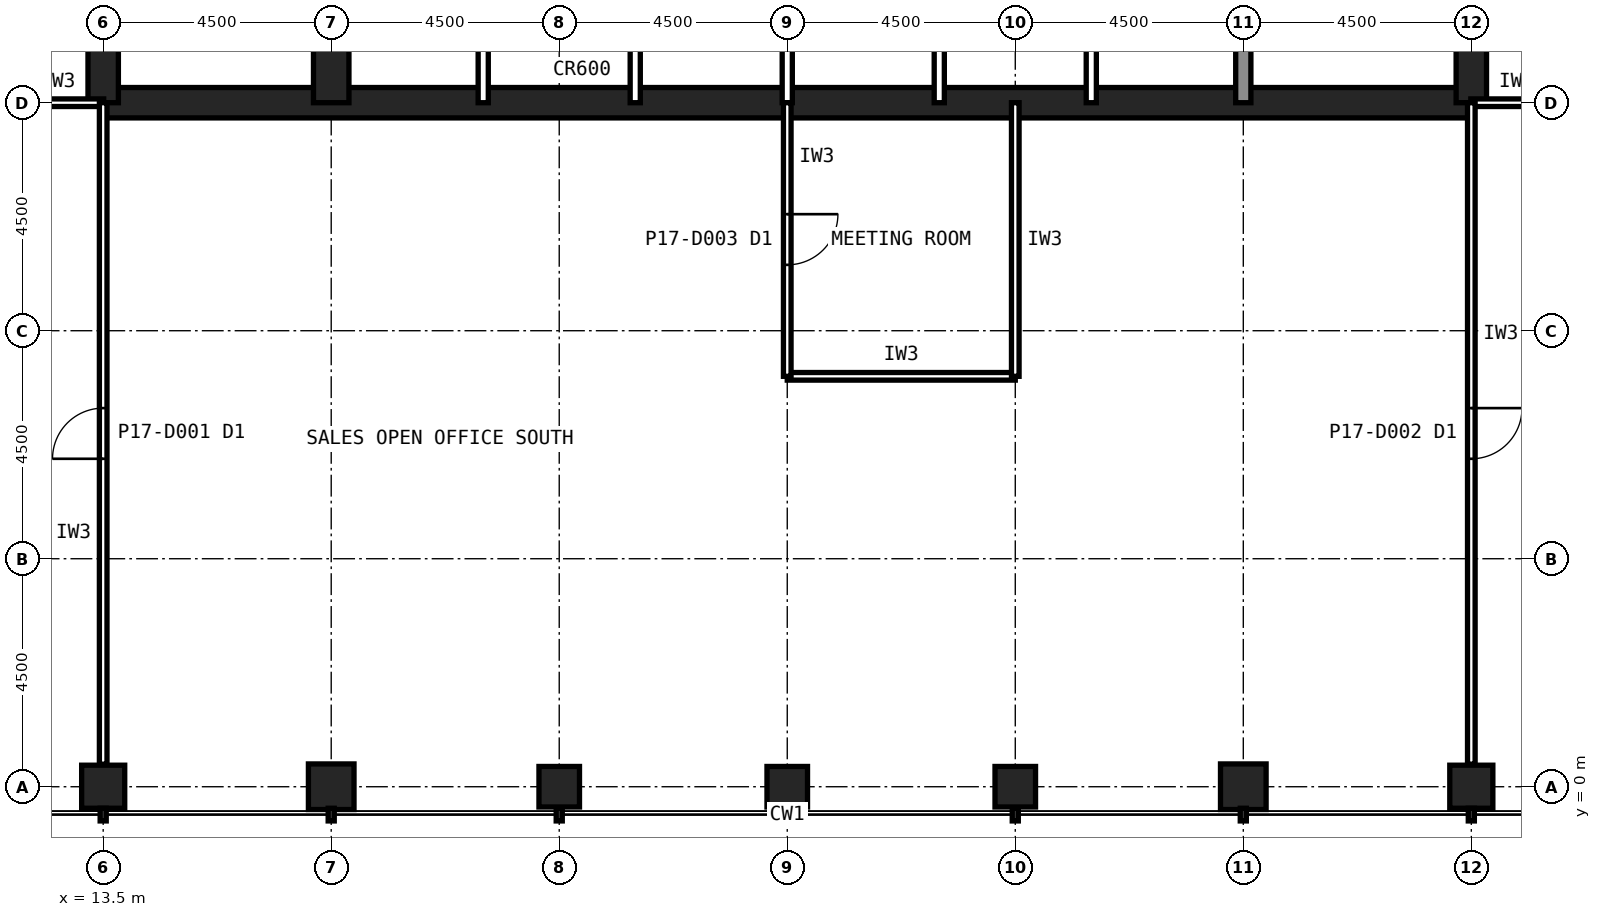
"""IFC4 building model, lengths in metres.
Left out: names, types, materials, properties, quantities, classifications, styles, units other than length and angle.
Written with IfcOpenShell. Run it as: python <this file> out.ifc"""

import sys

from ifc_helpers import new_model, si_unit, direction, frame, frame_2d, origin, origin_2d, place, context, subcontext, project, spatial, rectangle, hollow_rectangle, extrude, element, fill, save


model = new_model("IFC4")
c1 = context("Model", 3, precision=1e-05, world=origin(), true_north=direction((0.0, 1.0)))
c2 = subcontext(c1, "Body", "Model", "MODEL_VIEW")
j1 = project(units=[si_unit("LENGTHUNIT", "METRE"), si_unit("PLANEANGLEUNIT", "RADIAN")], contexts=[c1])
p1 = place(None, origin())
s1 = spatial("IfcSite", under=j1, at=p1, CompositionType="ELEMENT")
p2 = place(p1, origin())
s2 = spatial("IfcBuilding", under=s1, at=p2, CompositionType="ELEMENT")
p3 = place(p2, frame((0.0, 0.0, 71.0)))
s3 = spatial("IfcBuildingStorey", under=s2, at=p3, CompositionType="ELEMENT", Elevation=71.0)
p4 = place(p3, frame((13.5, 0.0, 0.0), z_axis=(0.0, 0.0, 1.0), x_axis=(1.0, 0.0, 0.0)))
e1 = element("IfcColumn", 1, at=p4, inside=s3, PredefinedType="COLUMN", context=c2, shape_type="SweptSolid", body=[
    extrude(hollow_rectangle(XDim=0.85, YDim=0.85, WallThickness=0.05, at=origin_2d()), origin(), (0.0, 0.0, 1.0), 4.2),
])
p5 = place(p3, frame((18.0, 0.0, 0.0), z_axis=(0.0, 0.0, 1.0), x_axis=(1.0, 0.0, 0.0)))
e2 = element("IfcColumn", 2, at=p5, inside=s3, PredefinedType="COLUMN", context=c2, shape_type="SweptSolid", body=[
    extrude(hollow_rectangle(XDim=0.9, YDim=0.9, WallThickness=0.063, at=origin_2d()), origin(), (0.0, 0.0, 1.0), 4.2),
])
for number, where, z_axis, x_axis in (
    (3, (22.5, 0.0, 0.0), (0.0, 0.0, 1.0), (1.0, 0.0, 0.0)),
    (4, (27.0, 0.0, 0.0), (0.0, 0.0, 1.0), (1.0, 0.0, 0.0)),
    (5, (31.5, 0.0, 0.0), (0.0, 0.0, 1.0), (1.0, 0.0, 0.0)),
):
    element("IfcColumn", number, at=place(p3, frame(where, z_axis=z_axis, x_axis=x_axis)), inside=s3, PredefinedType="COLUMN", context=c2, shape_type="SweptSolid", body=[
        extrude(hollow_rectangle(XDim=0.8, YDim=0.8, WallThickness=0.045, at=origin_2d()), origin(), (0.0, 0.0, 1.0), 4.2),
    ])
p6 = place(p3, frame((36.0, 0.0, 0.0), z_axis=(0.0, 0.0, 1.0), x_axis=(1.0, 0.0, 0.0)))
e6 = element("IfcColumn", 6, at=p6, inside=s3, PredefinedType="COLUMN", context=c2, shape_type="SweptSolid", body=[
    extrude(hollow_rectangle(XDim=0.9, YDim=0.9, WallThickness=0.063, at=origin_2d()), origin(), (0.0, 0.0, 1.0), 4.2),
])
p7 = place(p3, frame((40.5, 0.0, 0.0), z_axis=(0.0, 0.0, 1.0), x_axis=(1.0, 0.0, 0.0)))
e7 = element("IfcColumn", 7, at=p7, inside=s3, PredefinedType="COLUMN", context=c2, shape_type="SweptSolid", body=[
    extrude(hollow_rectangle(XDim=0.85, YDim=0.85, WallThickness=0.05, at=origin_2d()), origin(), (0.0, 0.0, 1.0), 4.2),
])
p8 = place(p3, frame((13.5, 13.5, 0.0), z_axis=(0.0, 0.0, 1.0), x_axis=(1.0, 0.0, 0.0)))
e8 = element("IfcWall", 8, at=p8, inside=s3, PredefinedType="SHEAR", context=c2, shape_type="SweptSolid", body=[
    extrude(rectangle(XDim=27.0, YDim=0.6, at=frame_2d((13.5, 0.0))), origin(), (0.0, 0.0, 1.0), 4.2),
])
p9 = place(p3, frame((40.5, 13.5, 0.0), z_axis=(0.0, 0.0, 1.0), x_axis=(0.0, 1.0, 0.0)))
e9 = element("IfcWall", 9, at=p9, inside=s3, PredefinedType="SHEAR", context=c2, shape_type="SweptSolid", body=[
    extrude(rectangle(XDim=27.0, YDim=0.6, at=frame_2d((13.5, 0.0))), origin(), (0.0, 0.0, 1.0), 4.2),
])
p10 = place(p9, frame((5.85, 0.0, 0.0)))
e10 = element("IfcOpeningElement", 10, at=p10, cuts=e9, PredefinedType="OPENING", context=c2, shape_type="SweptSolid", body=[
    extrude(rectangle(XDim=1.8, YDim=2.1, at=frame_2d((0.9, 1.05))), frame((0.0, 0.31, 0.0), z_axis=(0.0, -1.0, 0.0), x_axis=(1.0, 0.0, 0.0)), (0.0, 0.0, 1.0), 0.62),
])
p11 = place(p9, frame((19.65, 0.0, 0.0)))
e11 = element("IfcOpeningElement", 11, at=p11, cuts=e9, PredefinedType="OPENING", context=c2, shape_type="SweptSolid", body=[
    extrude(rectangle(XDim=1.2, YDim=2.1, at=frame_2d((0.6, 1.05))), frame((0.0, 0.31, 0.0), z_axis=(0.0, -1.0, 0.0), x_axis=(1.0, 0.0, 0.0)), (0.0, 0.0, 1.0), 0.62),
])
p12 = place(p3, frame((13.5, 40.5, 0.0), z_axis=(0.0, 0.0, 1.0), x_axis=(0.0, -1.0, 0.0)))
e12 = element("IfcWall", 12, at=p12, inside=s3, PredefinedType="SHEAR", context=c2, shape_type="SweptSolid", body=[
    extrude(rectangle(XDim=27.0, YDim=0.6, at=frame_2d((13.5, 0.0))), origin(), (0.0, 0.0, 1.0), 4.2),
])
p13 = place(p12, frame((19.65, 0.0, 0.0)))
e13 = element("IfcOpeningElement", 13, at=p13, cuts=e12, PredefinedType="OPENING", context=c2, shape_type="SweptSolid", body=[
    extrude(rectangle(XDim=1.2, YDim=2.1, at=frame_2d((0.6, 1.05))), frame((0.0, 0.31, 0.0), z_axis=(0.0, -1.0, 0.0), x_axis=(1.0, 0.0, 0.0)), (0.0, 0.0, 1.0), 0.62),
])
p14 = place(p12, frame((5.85, 0.0, 0.0)))
e14 = element("IfcOpeningElement", 14, at=p14, cuts=e12, PredefinedType="OPENING", context=c2, shape_type="SweptSolid", body=[
    extrude(rectangle(XDim=1.8, YDim=2.1, at=frame_2d((0.9, 1.05))), frame((0.0, 0.31, 0.0), z_axis=(0.0, -1.0, 0.0), x_axis=(1.0, 0.0, 0.0)), (0.0, 0.0, 1.0), 0.62),
])
p15 = place(p3, frame((18.0, 13.5, 0.0), z_axis=(0.0, 0.0, 1.0), x_axis=(0.0, 1.0, 0.0)))
e15 = element("IfcWall", 15, at=p15, inside=s3, PredefinedType="SHEAR", context=c2, shape_type="SweptSolid", body=[
    extrude(rectangle(XDim=18.0, YDim=0.7, at=frame_2d((9.0, 0.0))), origin(), (0.0, 0.0, 1.0), 4.2),
])
p16 = place(p3, frame((36.0, 13.5, 0.0), z_axis=(0.0, 0.0, 1.0), x_axis=(0.0, 1.0, 0.0)))
e16 = element("IfcWall", 16, at=p16, inside=s3, PredefinedType="SOLIDWALL", context=c2, shape_type="SweptSolid", body=[
    extrude(rectangle(XDim=4.5, YDim=0.3, at=frame_2d((2.25, 0.0))), origin(), (0.0, 0.0, 1.0), 4.04),
])
for number, where, z_axis, x_axis in (
    (17, (21.0, 13.5, 0.0), (0.0, 0.0, 1.0), (0.0, 1.0, 0.0)),
    (18, (24.0, 13.5, 0.0), (0.0, 0.0, 1.0), (0.0, 1.0, 0.0)),
    (19, (27.0, 13.5, 0.0), (0.0, 0.0, 1.0), (0.0, 1.0, 0.0)),
    (20, (30.0, 13.5, 0.0), (0.0, 0.0, 1.0), (0.0, 1.0, 0.0)),
    (21, (33.0, 13.5, 0.0), (0.0, 0.0, 1.0), (0.0, 1.0, 0.0)),
):
    element("IfcWall", number, at=place(p3, frame(where, z_axis=z_axis, x_axis=x_axis)), inside=s3, PredefinedType="PARTITIONING", context=c2, shape_type="SweptSolid", body=[
        extrude(rectangle(XDim=4.5, YDim=0.2, at=frame_2d((2.25, 0.0))), origin(), (0.0, 0.0, 1.0), 4.04),
    ])
for number, where, z_axis, x_axis in (
    (22, (11.7, 13.5, 0.0), (0.0, 0.0, 1.0), (1.0, 0.0, 0.0)),
    (23, (40.49, 13.5, 0.0), (0.0, 0.0, 1.0), (1.0, 0.0, 0.0)),
):
    element("IfcWall", number, at=place(p3, frame(where, z_axis=z_axis, x_axis=x_axis)), inside=s3, PredefinedType="PARTITIONING", context=c2, shape_type="SweptSolid", body=[
        extrude(rectangle(XDim=1.81, YDim=0.15, at=frame_2d((0.905, 0.0))), origin(), (0.0, 0.0, 1.0), 3.189),
    ])
p17 = place(p3, frame((27.0, 8.1, 0.0), z_axis=(0.0, 0.0, 1.0), x_axis=(1.0, 0.0, 0.0)))
e24 = element("IfcWall", 24, at=p17, inside=s3, PredefinedType="PARTITIONING", context=c2, shape_type="SweptSolid", body=[
    extrude(rectangle(XDim=4.5, YDim=0.15, at=frame_2d((2.25, 0.0))), origin(), (0.0, 0.0, 1.0), 4.04),
])
p18 = place(p3, frame((31.5, 8.1, 0.0), z_axis=(0.0, 0.0, 1.0), x_axis=(0.0, 1.0, 0.0)))
e25 = element("IfcWall", 25, at=p18, inside=s3, PredefinedType="PARTITIONING", context=c2, shape_type="SweptSolid", body=[
    extrude(rectangle(XDim=5.4, YDim=0.15, at=frame_2d((2.7, 0.0))), origin(), (0.0, 0.0, 1.0), 3.189),
])
p19 = place(p3, frame((27.0, 13.5, 0.0), z_axis=(0.0, 0.0, 1.0), x_axis=(0.0, -1.0, 0.0)))
e26 = element("IfcWall", 26, at=p19, inside=s3, PredefinedType="PARTITIONING", context=c2, shape_type="SweptSolid", body=[
    extrude(rectangle(XDim=5.4, YDim=0.15, at=frame_2d((2.7, 0.0))), origin(), (0.0, 0.0, 1.0), 3.189),
])
p20 = place(p19, frame((2.2, 0.0, 0.0)))
e27 = element("IfcOpeningElement", 27, at=p20, cuts=e26, PredefinedType="OPENING", context=c2, shape_type="SweptSolid", body=[
    extrude(rectangle(XDim=1.0, YDim=2.1, at=frame_2d((0.5, 1.05))), frame((0.0, 0.085, 0.0), z_axis=(0.0, -1.0, 0.0), x_axis=(1.0, 0.0, 0.0)), (0.0, 0.0, 1.0), 0.17),
])
p21 = place(p3, frame((13.5, 0.445, 0.0), z_axis=(0.0, 0.0, 1.0), x_axis=(0.0, 1.0, 0.0)))
e28 = element("IfcWall", 28, at=p21, inside=s3, PredefinedType="PARTITIONING", context=c2, shape_type="SweptSolid", body=[
    extrude(rectangle(XDim=13.055, YDim=0.15, at=frame_2d((6.527, 0.0))), origin(), (0.0, 0.0, 1.0), 3.189),
])
p22 = place(p21, frame((6.028, 0.0, 0.0)))
e29 = element("IfcOpeningElement", 29, at=p22, cuts=e28, PredefinedType="OPENING", context=c2, shape_type="SweptSolid", body=[
    extrude(rectangle(XDim=1.0, YDim=2.1, at=frame_2d((0.5, 1.05))), frame((0.0, 0.085, 0.0), z_axis=(0.0, -1.0, 0.0), x_axis=(1.0, 0.0, 0.0)), (0.0, 0.0, 1.0), 0.17),
])
p23 = place(p3, frame((40.5, 13.5, 0.0), z_axis=(0.0, 0.0, 1.0), x_axis=(0.0, -1.0, 0.0)))
e30 = element("IfcWall", 30, at=p23, inside=s3, PredefinedType="PARTITIONING", context=c2, shape_type="SweptSolid", body=[
    extrude(rectangle(XDim=13.055, YDim=0.15, at=frame_2d((6.527, 0.0))), origin(), (0.0, 0.0, 1.0), 3.189),
])
p24 = place(p23, frame((6.028, 0.0, 0.0)))
e31 = element("IfcOpeningElement", 31, at=p24, cuts=e30, PredefinedType="OPENING", context=c2, shape_type="SweptSolid", body=[
    extrude(rectangle(XDim=1.0, YDim=2.1, at=frame_2d((0.5, 1.05))), frame((0.0, 0.085, 0.0), z_axis=(0.0, -1.0, 0.0), x_axis=(1.0, 0.0, 0.0)), (0.0, 0.0, 1.0), 0.17),
])
p25 = place(p20, origin())
e32 = element("IfcDoor", 32, at=p25, inside=s3, OperationType="SINGLE_SWING_LEFT", PredefinedType="DOOR", context=c2, shape_type="SweptSolid", body=[
    extrude(rectangle(XDim=1.0, YDim=2.1, at=frame_2d((0.5, 1.05))), frame((0.0, 0.025, 0.0), z_axis=(0.0, -1.0, 0.0), x_axis=(1.0, 0.0, 0.0)), (0.0, 0.0, 1.0), 0.05),
])
fill(e27, e32)
p26 = place(p22, origin())
e33 = element("IfcDoor", 33, at=p26, inside=s3, OperationType="SINGLE_SWING_LEFT", PredefinedType="DOOR", context=c2, shape_type="SweptSolid", body=[
    extrude(rectangle(XDim=1.0, YDim=2.1, at=frame_2d((0.5, 1.05))), frame((0.0, 0.025, 0.0), z_axis=(0.0, -1.0, 0.0), x_axis=(1.0, 0.0, 0.0)), (0.0, 0.0, 1.0), 0.05),
])
fill(e29, e33)
p27 = place(p24, origin())
e34 = element("IfcDoor", 34, at=p27, inside=s3, OperationType="SINGLE_SWING_LEFT", PredefinedType="DOOR", context=c2, shape_type="SweptSolid", body=[
    extrude(rectangle(XDim=1.0, YDim=2.1, at=frame_2d((0.5, 1.05))), frame((0.0, 0.025, 0.0), z_axis=(0.0, -1.0, 0.0), x_axis=(1.0, 0.0, 0.0)), (0.0, 0.0, 1.0), 0.05),
])
fill(e31, e34)
save(model, sys.argv[1])
